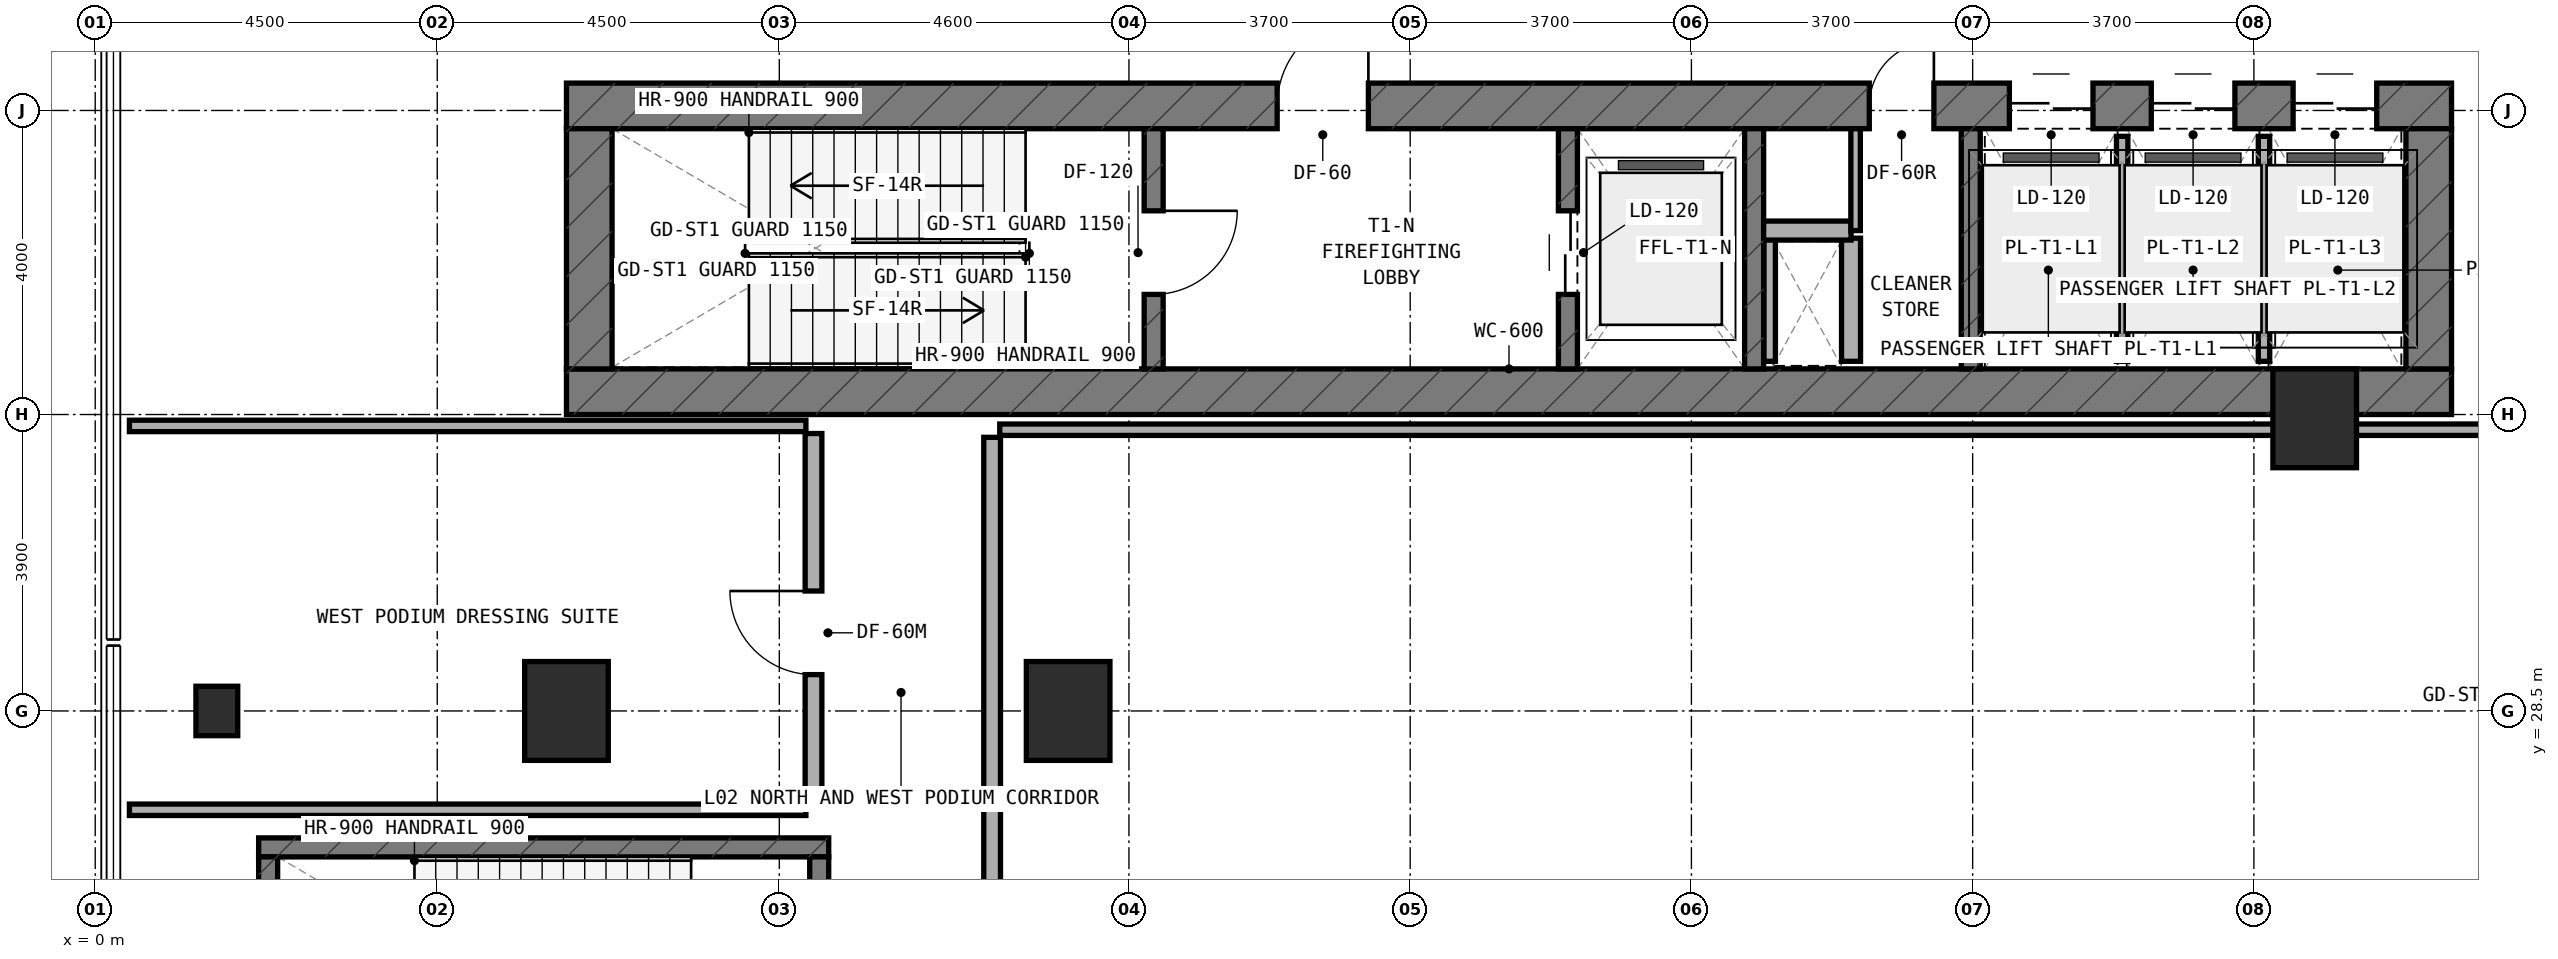
"""IFC4 building model, lengths in metres.
Left out: names, types, materials, properties, quantities, classifications, styles, units other than length and angle.
Written with IfcOpenShell. Run it as: python <this file> out.ifc"""

import sys

from ifc_helpers import new_model, si_unit, direction, frame, frame_2d, origin, origin_2d, place, context, subcontext, project, spatial, rectangle, extrude, element, fill, save


model = new_model("IFC4")
c1 = context("Model", 3, precision=1e-05, world=origin(), true_north=direction((0.0, 1.0)))
c2 = subcontext(c1, "Body", "Model", "MODEL_VIEW")
j1 = project(units=[si_unit("LENGTHUNIT", "METRE"), si_unit("PLANEANGLEUNIT", "RADIAN")], contexts=[c1])
p1 = place(None, origin())
s1 = spatial("IfcSite", under=j1, at=p1, CompositionType="ELEMENT")
p2 = place(p1, origin())
s2 = spatial("IfcBuilding", under=s1, at=p2, CompositionType="ELEMENT")
p3 = place(p2, frame((0.0, 0.0, 10.2)))
s3 = spatial("IfcBuildingStorey", under=s2, at=p3, CompositionType="ELEMENT", Elevation=10.2)
p4 = place(p3, frame((6.2, 32.7, 0.0), z_axis=(0.0, 0.0, 1.0), x_axis=(1.0, 0.0, 0.0)))
e1 = element("IfcWall", 1, at=p4, inside=s3, PredefinedType="SHEAR", context=c2, shape_type="SweptSolid", body=[
    extrude(rectangle(XDim=24.8, YDim=0.6, at=frame_2d((12.4, 0.0))), origin(), (0.0, 0.0, 1.0), 4.8),
])
p5 = place(p3, frame((6.2, 36.46, 0.0), z_axis=(0.0, 0.0, 1.0), x_axis=(1.0, 0.0, 0.0)))
e2 = element("IfcWall", 2, at=p5, inside=s3, PredefinedType="SHEAR", context=c2, shape_type="SweptSolid", body=[
    extrude(rectangle(XDim=24.8, YDim=0.6, at=frame_2d((12.4, 0.0))), origin(), (0.0, 0.0, 1.0), 4.8),
])
p6 = place(p5, frame((9.35, 0.0, 0.0)))
e3 = element("IfcOpeningElement", 3, at=p6, cuts=e2, PredefinedType="OPENING", context=c2, shape_type="SweptSolid", body=[
    extrude(rectangle(XDim=1.2, YDim=2.15, at=frame_2d((0.6, 1.075))), frame((0.0, 0.31, 0.0), z_axis=(0.0, -1.0, 0.0), x_axis=(1.0, 0.0, 0.0)), (0.0, 0.0, 1.0), 0.62),
])
p7 = place(p5, frame((17.14, 0.0, 0.0)))
e4 = element("IfcOpeningElement", 4, at=p7, cuts=e2, PredefinedType="OPENING", context=c2, shape_type="SweptSolid", body=[
    extrude(rectangle(XDim=0.85, YDim=2.1, at=frame_2d((0.425, 1.05))), frame((0.0, 0.31, 0.0), z_axis=(0.0, -1.0, 0.0), x_axis=(1.0, 0.0, 0.0)), (0.0, 0.0, 1.0), 0.62),
])
p8 = place(p5, frame((18.983, 0.0, 0.0)))
e5 = element("IfcOpeningElement", 5, at=p8, cuts=e2, PredefinedType="OPENING", context=c2, shape_type="SweptSolid", body=[
    extrude(rectangle(XDim=1.1, YDim=2.15, at=frame_2d((0.55, 1.075))), frame((0.0, 0.31, 0.0), z_axis=(0.0, -1.0, 0.0), x_axis=(1.0, 0.0, 0.0)), (0.0, 0.0, 1.0), 0.62),
])
p9 = place(p5, frame((20.85, 0.0, 0.0)))
e6 = element("IfcOpeningElement", 6, at=p9, cuts=e2, PredefinedType="OPENING", context=c2, shape_type="SweptSolid", body=[
    extrude(rectangle(XDim=1.1, YDim=2.15, at=frame_2d((0.55, 1.075))), frame((0.0, 0.31, 0.0), z_axis=(0.0, -1.0, 0.0), x_axis=(1.0, 0.0, 0.0)), (0.0, 0.0, 1.0), 0.62),
])
p10 = place(p5, frame((22.716, 0.0, 0.0)))
e7 = element("IfcOpeningElement", 7, at=p10, cuts=e2, PredefinedType="OPENING", context=c2, shape_type="SweptSolid", body=[
    extrude(rectangle(XDim=1.1, YDim=2.15, at=frame_2d((0.55, 1.075))), frame((0.0, 0.31, 0.0), z_axis=(0.0, -1.0, 0.0), x_axis=(1.0, 0.0, 0.0)), (0.0, 0.0, 1.0), 0.62),
])
for number, where, z_axis, x_axis in (
    (8, (6.5, 33.0, 0.0), (0.0, 0.0, 1.0), (0.0, 1.0, 0.0)),
    (9, (30.7, 33.0, 0.0), (0.0, 0.0, 1.0), (0.0, 1.0, 0.0)),
):
    element("IfcWall", number, at=place(p3, frame(where, z_axis=z_axis, x_axis=x_axis)), inside=s3, PredefinedType="SHEAR", context=c2, shape_type="SweptSolid", body=[
        extrude(rectangle(XDim=3.16, YDim=0.6, at=frame_2d((1.58, 0.0))), origin(), (0.0, 0.0, 1.0), 4.8),
    ])
p11 = place(p3, frame((13.925, 33.0, 0.0), z_axis=(0.0, 0.0, 1.0), x_axis=(0.0, 1.0, 0.0)))
e10 = element("IfcWall", 10, at=p11, inside=s3, PredefinedType="STANDARD", context=c2, shape_type="SweptSolid", body=[
    extrude(rectangle(XDim=3.16, YDim=0.25, at=frame_2d((1.58, 0.0))), origin(), (0.0, 0.0, 1.0), 4.45),
])
p12 = place(p11, frame((0.98, 0.0, 0.0)))
e11 = element("IfcOpeningElement", 11, at=p12, cuts=e10, PredefinedType="OPENING", context=c2, shape_type="SweptSolid", body=[
    extrude(rectangle(XDim=1.1, YDim=2.15, at=frame_2d((0.55, 1.075))), frame((0.0, 0.135, 0.0), z_axis=(0.0, -1.0, 0.0), x_axis=(1.0, 0.0, 0.0)), (0.0, 0.0, 1.0), 0.27),
])
p13 = place(p3, frame((19.375, 33.0, 0.0), z_axis=(0.0, 0.0, 1.0), x_axis=(0.0, 1.0, 0.0)))
e12 = element("IfcWall", 12, at=p13, inside=s3, PredefinedType="STANDARD", context=c2, shape_type="SweptSolid", body=[
    extrude(rectangle(XDim=3.16, YDim=0.25, at=frame_2d((1.58, 0.0))), origin(), (0.0, 0.0, 1.0), 4.45),
])
p14 = place(p13, frame((0.98, 0.0, 0.0)))
e13 = element("IfcOpeningElement", 13, at=p14, cuts=e12, PredefinedType="OPENING", context=c2, shape_type="SweptSolid", body=[
    extrude(rectangle(XDim=1.1, YDim=2.15, at=frame_2d((0.55, 1.075))), frame((0.0, 0.135, 0.0), z_axis=(0.0, -1.0, 0.0), x_axis=(1.0, 0.0, 0.0)), (0.0, 0.0, 1.0), 0.27),
])
for number, where, z_axis, x_axis in (
    (14, (21.825, 33.0, 0.0), (0.0, 0.0, 1.0), (0.0, 1.0, 0.0)),
    (15, (24.675, 33.0, 0.0), (0.0, 0.0, 1.0), (0.0, 1.0, 0.0)),
):
    element("IfcWall", number, at=place(p3, frame(where, z_axis=z_axis, x_axis=x_axis)), inside=s3, PredefinedType="STANDARD", context=c2, shape_type="SweptSolid", body=[
        extrude(rectangle(XDim=3.16, YDim=0.25, at=frame_2d((1.58, 0.0))), origin(), (0.0, 0.0, 1.0), 4.45),
    ])
p15 = place(p3, frame((2.15, 26.705, 0.0), z_axis=(0.0, 0.0, 1.0), x_axis=(1.0, 0.0, 0.0)))
e16 = element("IfcWall", 16, at=p15, inside=s3, PredefinedType="STANDARD", context=c2, shape_type="SweptSolid", body=[
    extrude(rectangle(XDim=7.5, YDim=0.25, at=frame_2d((3.75, 0.0))), origin(), (0.0, 0.0, 1.0), 4.8),
])
p16 = place(p3, frame((2.275, 23.42, 0.0), z_axis=(0.0, 0.0, 1.0), x_axis=(0.0, 1.0, 0.0)))
e17 = element("IfcWall", 17, at=p16, inside=s3, PredefinedType="STANDARD", context=c2, shape_type="SweptSolid", body=[
    extrude(rectangle(XDim=3.16, YDim=0.25, at=frame_2d((1.58, 0.0))), origin(), (0.0, 0.0, 1.0), 4.8),
])
p17 = place(p3, frame((9.525, 23.42, 0.0), z_axis=(0.0, 0.0, 1.0), x_axis=(0.0, 1.0, 0.0)))
e18 = element("IfcWall", 18, at=p17, inside=s3, PredefinedType="STANDARD", context=c2, shape_type="SweptSolid", body=[
    extrude(rectangle(XDim=3.16, YDim=0.25, at=frame_2d((1.58, 0.0))), origin(), (0.0, 0.0, 1.0), 4.8),
])
p18 = place(p17, frame((0.98, 0.0, 0.0)))
e19 = element("IfcOpeningElement", 19, at=p18, cuts=e18, PredefinedType="OPENING", context=c2, shape_type="SweptSolid", body=[
    extrude(rectangle(XDim=1.2, YDim=2.15, at=frame_2d((0.6, 1.075))), frame((0.0, 0.135, 0.0), z_axis=(0.0, -1.0, 0.0), x_axis=(1.0, 0.0, 0.0)), (0.0, 0.0, 1.0), 0.27),
])
for number, where, z_axis, x_axis in (
    (20, (6.2, 28.5, 0.0), (0.0, 0.0, 1.0), (1.0, 0.0, 0.0)),
    (21, (12.8, 28.5, 0.0), (0.0, 0.0, 1.0), (1.0, 0.0, 0.0)),
    (22, (29.2, 32.35, 0.0), (0.0, 0.0, 1.0), (1.0, 0.0, 0.0)),
):
    element("IfcColumn", number, at=place(p3, frame(where, z_axis=z_axis, x_axis=x_axis)), inside=s3, PredefinedType="COLUMN", context=c2, shape_type="SweptSolid", body=[
        extrude(rectangle(XDim=1.1, YDim=1.3, at=origin_2d()), origin(), (0.0, 0.0, 1.0), 4.8),
    ])
p19 = place(p3, frame((1.6, 28.5, 0.0), z_axis=(0.0, 0.0, 1.0), x_axis=(1.0, 0.0, 0.0)))
e23 = element("IfcColumn", 23, at=p19, inside=s3, PredefinedType="PILASTER", context=c2, shape_type="SweptSolid", body=[
    extrude(rectangle(XDim=0.55, YDim=0.65, at=origin_2d()), origin(), (0.0, 0.0, 1.0), 4.8),
])
p20 = place(p3, frame((22.03, 33.1, 0.0), z_axis=(0.0, 0.0, 1.0), x_axis=(0.0, 1.0, 0.0)))
e24 = element("IfcWall", 24, at=p20, inside=s3, PredefinedType="PARTITIONING", context=c2, shape_type="SweptSolid", body=[
    extrude(rectangle(XDim=1.62, YDim=0.15, at=frame_2d((0.81, 0.0))), origin(), (0.0, 0.0, 1.0), 4.45),
])
p21 = place(p3, frame((23.1, 33.1, 0.0), z_axis=(0.0, 0.0, 1.0), x_axis=(0.0, 1.0, 0.0)))
e25 = element("IfcWall", 25, at=p21, inside=s3, PredefinedType="SOLIDWALL", context=c2, shape_type="SweptSolid", body=[
    extrude(rectangle(XDim=1.62, YDim=0.25, at=frame_2d((0.81, 0.0))), origin(), (0.0, 0.0, 1.0), 4.45),
])
p22 = place(p3, frame((21.95, 34.82, 0.0), z_axis=(0.0, 0.0, 1.0), x_axis=(1.0, 0.0, 0.0)))
e26 = element("IfcWall", 26, at=p22, inside=s3, PredefinedType="SOLIDWALL", context=c2, shape_type="SweptSolid", body=[
    extrude(rectangle(XDim=1.15, YDim=0.25, at=frame_2d((0.575, 0.0))), origin(), (0.0, 0.0, 1.0), 4.45),
])
p23 = place(p3, frame((23.16, 34.82, 0.0), z_axis=(0.0, 0.0, 1.0), x_axis=(0.0, 1.0, 0.0)))
e27 = element("IfcWall", 27, at=p23, inside=s3, PredefinedType="PARTITIONING", context=c2, shape_type="SweptSolid", body=[
    extrude(rectangle(XDim=1.34, YDim=0.125, at=frame_2d((0.67, 0.0))), origin(), (0.0, 0.0, 1.0), 4.45),
])
p24 = place(p3, frame((26.667, 33.1, 0.0), z_axis=(0.0, 0.0, 1.0), x_axis=(0.0, 1.0, 0.0)))
e28 = element("IfcWall", 28, at=p24, inside=s3, PredefinedType="PARTITIONING", context=c2, shape_type="SweptSolid", body=[
    extrude(rectangle(XDim=2.96, YDim=0.15, at=frame_2d((1.48, 0.0))), origin(), (0.0, 0.0, 1.0), 4.45),
])
p25 = place(p3, frame((28.533, 33.1, 0.0), z_axis=(0.0, 0.0, 1.0), x_axis=(0.0, 1.0, 0.0)))
e29 = element("IfcWall", 29, at=p25, inside=s3, PredefinedType="PARTITIONING", context=c2, shape_type="SweptSolid", body=[
    extrude(rectangle(XDim=2.96, YDim=0.15, at=frame_2d((1.48, 0.0))), origin(), (0.0, 0.0, 1.0), 3.525),
])
p26 = place(p3, frame((11.9, 32.2, 0.0), z_axis=(0.0, 0.0, 1.0), x_axis=(1.0, 0.0, 0.0)))
e30 = element("IfcWall", 30, at=p26, inside=s3, PredefinedType="PARTITIONING", context=c2, shape_type="SweptSolid", body=[
    extrude(rectangle(XDim=19.8, YDim=0.15, at=frame_2d((9.9, 0.0))), origin(), (0.0, 0.0, 1.0), 3.525),
])
p27 = place(p3, frame((11.8, 17.9, 0.0), z_axis=(0.0, 0.0, 1.0), x_axis=(0.0, 1.0, 0.0)))
e31 = element("IfcWall", 31, at=p27, inside=s3, PredefinedType="SOLIDWALL", context=c2, shape_type="SweptSolid", body=[
    extrude(rectangle(XDim=14.2, YDim=0.22, at=frame_2d((7.1, 0.0))), origin(), (0.0, 0.0, 1.0), 3.525),
])
p28 = place(p27, frame((5.885, 0.0, 0.0)))
e32 = element("IfcOpeningElement", 32, at=p28, cuts=e31, PredefinedType="OPENING", context=c2, shape_type="SweptSolid", body=[
    extrude(rectangle(XDim=1.1, YDim=2.1, at=frame_2d((0.55, 1.05))), frame((0.0, 0.12, 0.0), z_axis=(0.0, -1.0, 0.0), x_axis=(1.0, 0.0, 0.0)), (0.0, 0.0, 1.0), 0.24),
])
p29 = place(p3, frame((0.45, 27.2, 0.0), z_axis=(0.0, 0.0, 1.0), x_axis=(1.0, 0.0, 0.0)))
e33 = element("IfcWall", 33, at=p29, inside=s3, PredefinedType="PARTITIONING", context=c2, shape_type="SweptSolid", body=[
    extrude(rectangle(XDim=8.9, YDim=0.15, at=frame_2d((4.45, 0.0))), origin(), (0.0, 0.0, 1.0), 3.925),
])
p30 = place(p3, frame((0.45, 32.25, 0.0), z_axis=(0.0, 0.0, 1.0), x_axis=(1.0, 0.0, 0.0)))
e34 = element("IfcWall", 34, at=p30, inside=s3, PredefinedType="PARTITIONING", context=c2, shape_type="SweptSolid", body=[
    extrude(rectangle(XDim=8.9, YDim=0.15, at=frame_2d((4.45, 0.0))), origin(), (0.0, 0.0, 1.0), 3.725),
])
p31 = place(p3, frame((9.45, 27.3, 0.0), z_axis=(0.0, 0.0, 1.0), x_axis=(0.0, 1.0, 0.0)))
e35 = element("IfcWall", 35, at=p31, inside=s3, PredefinedType="SOLIDWALL", context=c2, shape_type="SweptSolid", body=[
    extrude(rectangle(XDim=4.85, YDim=0.22, at=frame_2d((2.425, 0.0))), origin(), (0.0, 0.0, 1.0), 3.525),
])
p32 = place(p31, frame((1.678, 0.0, 0.0)))
e36 = element("IfcOpeningElement", 36, at=p32, cuts=e35, PredefinedType="OPENING", context=c2, shape_type="SweptSolid", body=[
    extrude(rectangle(XDim=1.1, YDim=2.1, at=frame_2d((0.55, 1.05))), frame((0.0, 0.12, 0.0), z_axis=(0.0, -1.0, 0.0), x_axis=(1.0, 0.0, 0.0)), (0.0, 0.0, 1.0), 0.24),
])
p33 = place(p12, frame((1.1, 0.0, 0.0), z_axis=(0.0, 0.0, 1.0), x_axis=(-1.0, 0.0, 0.0)))
e37 = element("IfcDoor", 37, at=p33, inside=s3, OperationType="SINGLE_SWING_LEFT", PredefinedType="DOOR", context=c2, shape_type="SweptSolid", body=[
    extrude(rectangle(XDim=1.1, YDim=2.15, at=frame_2d((0.55, 1.075))), frame((0.0, 0.025, 0.0), z_axis=(0.0, -1.0, 0.0), x_axis=(1.0, 0.0, 0.0)), (0.0, 0.0, 1.0), 0.05),
])
fill(e11, e37)
p34 = place(p6, origin())
e38 = element("IfcDoor", 38, at=p34, inside=s3, OperationType="SINGLE_SWING_RIGHT", PredefinedType="DOOR", context=c2, shape_type="SweptSolid", body=[
    extrude(rectangle(XDim=1.2, YDim=2.15, at=frame_2d((0.6, 1.075))), frame((0.0, 0.025, 0.0), z_axis=(0.0, -1.0, 0.0), x_axis=(1.0, 0.0, 0.0)), (0.0, 0.0, 1.0), 0.05),
])
fill(e3, e38)
p35 = place(p14, origin())
e39 = element("IfcDoor", 39, at=p35, inside=s3, OperationType="DOUBLE_DOOR_SLIDING", PredefinedType="DOOR", context=c2, shape_type="SweptSolid", body=[
    extrude(rectangle(XDim=1.1, YDim=2.15, at=frame_2d((0.55, 1.075))), frame((0.0, 0.025, 0.0), z_axis=(0.0, -1.0, 0.0), x_axis=(1.0, 0.0, 0.0)), (0.0, 0.0, 1.0), 0.05),
])
fill(e13, e39)
p36 = place(p7, origin())
e40 = element("IfcDoor", 40, at=p36, inside=s3, OperationType="SINGLE_SWING_RIGHT", PredefinedType="DOOR", context=c2, shape_type="SweptSolid", body=[
    extrude(rectangle(XDim=0.85, YDim=2.1, at=frame_2d((0.425, 1.05))), frame((0.0, 0.025, 0.0), z_axis=(0.0, -1.0, 0.0), x_axis=(1.0, 0.0, 0.0)), (0.0, 0.0, 1.0), 0.05),
])
fill(e4, e40)
p37 = place(p8, origin())
e41 = element("IfcDoor", 41, at=p37, inside=s3, OperationType="DOUBLE_DOOR_SLIDING", PredefinedType="DOOR", context=c2, shape_type="SweptSolid", body=[
    extrude(rectangle(XDim=1.1, YDim=2.15, at=frame_2d((0.55, 1.075))), frame((0.0, 0.025, 0.0), z_axis=(0.0, -1.0, 0.0), x_axis=(1.0, 0.0, 0.0)), (0.0, 0.0, 1.0), 0.05),
])
fill(e5, e41)
p38 = place(p9, origin())
e42 = element("IfcDoor", 42, at=p38, inside=s3, OperationType="DOUBLE_DOOR_SLIDING", PredefinedType="DOOR", context=c2, shape_type="SweptSolid", body=[
    extrude(rectangle(XDim=1.1, YDim=2.15, at=frame_2d((0.55, 1.075))), frame((0.0, 0.025, 0.0), z_axis=(0.0, -1.0, 0.0), x_axis=(1.0, 0.0, 0.0)), (0.0, 0.0, 1.0), 0.05),
])
fill(e6, e42)
p39 = place(p10, origin())
e43 = element("IfcDoor", 43, at=p39, inside=s3, OperationType="DOUBLE_DOOR_SLIDING", PredefinedType="DOOR", context=c2, shape_type="SweptSolid", body=[
    extrude(rectangle(XDim=1.1, YDim=2.15, at=frame_2d((0.55, 1.075))), frame((0.0, 0.025, 0.0), z_axis=(0.0, -1.0, 0.0), x_axis=(1.0, 0.0, 0.0)), (0.0, 0.0, 1.0), 0.05),
])
fill(e7, e43)
p40 = place(p32, origin())
e44 = element("IfcDoor", 44, at=p40, inside=s3, OperationType="SINGLE_SWING_RIGHT", PredefinedType="DOOR", context=c2, shape_type="SweptSolid", body=[
    extrude(rectangle(XDim=1.1, YDim=2.1, at=frame_2d((0.55, 1.05))), frame((0.0, 0.025, 0.0), z_axis=(0.0, -1.0, 0.0), x_axis=(1.0, 0.0, 0.0)), (0.0, 0.0, 1.0), 0.05),
])
fill(e36, e44)
save(model, sys.argv[1])
